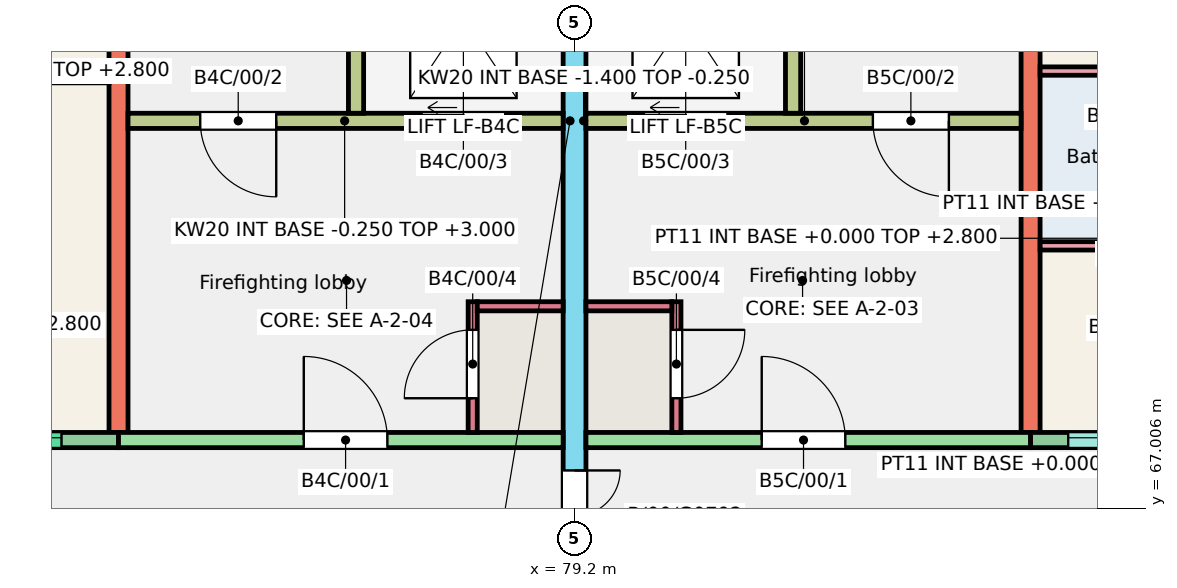
"""IFC4 building model, lengths in metres.
Left out: names, types, materials, properties, quantities, classifications, styles, units other than length and angle.
Written with IfcOpenShell. Run it as: python <this file> out.ifc"""

import sys

from ifc_helpers import new_model, si_unit, direction, frame, frame_2d, origin, place, context, subcontext, project, spatial, rectangle, extrude, element, fill, save


model = new_model("IFC4")
c1 = context("Model", 3, precision=1e-05, world=origin(), true_north=direction((0.0, 1.0)))
c2 = subcontext(c1, "Body", "Model", "MODEL_VIEW")
j1 = project(units=[si_unit("LENGTHUNIT", "METRE"), si_unit("PLANEANGLEUNIT", "RADIAN")], contexts=[c1])
p1 = place(None, origin())
s1 = spatial("IfcSite", under=j1, at=p1, CompositionType="ELEMENT")
p2 = place(p1, origin())
s2 = spatial("IfcBuilding", under=s1, at=p2, CompositionType="ELEMENT")
p3 = place(p2, origin())
s3 = spatial("IfcBuildingStorey", under=s2, at=p3, CompositionType="ELEMENT", Elevation=0.0)
p4 = place(p3, frame((73.2, 68.0, -0.25), z_axis=(0.0, 0.0, 1.0), x_axis=(0.0, 1.0, 0.0)))
e1 = element("IfcWall", 1, at=p4, inside=s3, PredefinedType="SHEAR", context=c2, shape_type="SweptSolid", body=[
    extrude(rectangle(XDim=9.0, YDim=0.25, at=frame_2d((4.5, 0.0))), origin(), (0.0, 0.0, 1.0), 3.25),
])
p5 = place(p3, frame((79.2, 66.0, -0.25), z_axis=(0.0, 0.0, 1.0), x_axis=(0.0, 1.0, 0.0)))
e2 = element("IfcWall", 2, at=p5, inside=s3, PredefinedType="SHEAR", context=c2, shape_type="SweptSolid", body=[
    extrude(rectangle(XDim=11.0, YDim=0.3, at=frame_2d((5.5, 0.0))), origin(), (0.0, 0.0, 1.0), 3.25),
])
p6 = place(p5, frame((0.3, 0.0, 0.25)))
e3 = element("IfcOpeningElement", 3, at=p6, cuts=e2, PredefinedType="OPENING", context=c2, shape_type="SweptSolid", body=[
    extrude(rectangle(XDim=1.2, YDim=2.1, at=frame_2d((0.6, 1.05))), frame((0.0, 0.16, 0.0), z_axis=(0.0, -1.0, 0.0), x_axis=(1.0, 0.0, 0.0)), (0.0, 0.0, 1.0), 0.32),
])
p7 = place(p3, frame((85.2, 68.0, -0.25), z_axis=(0.0, 0.0, 1.0), x_axis=(0.0, 1.0, 0.0)))
e4 = element("IfcWall", 4, at=p7, inside=s3, PredefinedType="SHEAR", context=c2, shape_type="SweptSolid", body=[
    extrude(rectangle(XDim=9.0, YDim=0.25, at=frame_2d((4.5, 0.0))), origin(), (0.0, 0.0, 1.0), 3.25),
])
p8 = place(p3, frame((69.6, 67.9, -0.25), z_axis=(0.0, 0.0, 1.0), x_axis=(1.0, 0.0, 0.0)))
e5 = element("IfcWall", 5, at=p8, inside=s3, PredefinedType="SOLIDWALL", context=c2, shape_type="SweptSolid", body=[
    extrude(rectangle(XDim=3.6, YDim=0.2, at=frame_2d((1.8, 0.0))), origin(), (0.0, 0.0, 1.0), 3.25),
])
p9 = place(p8, frame((0.75, 0.0, 1.45)))
e6 = element("IfcOpeningElement", 6, at=p9, cuts=e5, PredefinedType="OPENING", context=c2, shape_type="SweptSolid", body=[
    extrude(rectangle(XDim=2.1, YDim=1.2, at=frame_2d((1.05, 0.6))), frame((0.0, 0.11, 0.0), z_axis=(0.0, -1.0, 0.0), x_axis=(1.0, 0.0, 0.0)), (0.0, 0.0, 1.0), 0.22),
])
p10 = place(p3, frame((73.2, 67.9, -0.25), z_axis=(0.0, 0.0, 1.0), x_axis=(1.0, 0.0, 0.0)))
e7 = element("IfcWall", 7, at=p10, inside=s3, PredefinedType="SHEAR", context=c2, shape_type="SweptSolid", body=[
    extrude(rectangle(XDim=5.85, YDim=0.2, at=frame_2d((2.925, 0.0))), origin(), (0.0, 0.0, 1.0), 3.25),
])
p11 = place(p10, frame((2.438, 0.0, 0.25)))
e8 = element("IfcOpeningElement", 8, at=p11, cuts=e7, PredefinedType="OPENING", context=c2, shape_type="SweptSolid", body=[
    extrude(rectangle(XDim=1.1, YDim=2.1, at=frame_2d((0.55, 1.05))), frame((0.0, 0.11, 0.0), z_axis=(0.0, -1.0, 0.0), x_axis=(1.0, 0.0, 0.0)), (0.0, 0.0, 1.0), 0.22),
])
p12 = place(p3, frame((73.325, 72.1, -0.25), z_axis=(0.0, 0.0, 1.0), x_axis=(1.0, 0.0, 0.0)))
e9 = element("IfcWall", 9, at=p12, inside=s3, PredefinedType="SHEAR", context=c2, shape_type="SweptSolid", body=[
    extrude(rectangle(XDim=5.725, YDim=0.2, at=frame_2d((2.863, 0.0))), origin(), (0.0, 0.0, 1.0), 3.25),
])
p13 = place(p12, frame((0.95, 0.0, 0.25)))
e10 = element("IfcOpeningElement", 10, at=p13, cuts=e9, PredefinedType="OPENING", context=c2, shape_type="SweptSolid", body=[
    extrude(rectangle(XDim=1.0, YDim=2.1, at=frame_2d((0.5, 1.05))), frame((0.0, 0.11, 0.0), z_axis=(0.0, -1.0, 0.0), x_axis=(1.0, 0.0, 0.0)), (0.0, 0.0, 1.0), 0.22),
])
p14 = place(p12, frame((3.863, 0.0, 0.25)))
e11 = element("IfcOpeningElement", 11, at=p14, cuts=e9, PredefinedType="OPENING", context=c2, shape_type="SweptSolid", body=[
    extrude(rectangle(XDim=1.1, YDim=2.1, at=frame_2d((0.55, 1.05))), frame((0.0, 0.11, 0.0), z_axis=(0.0, -1.0, 0.0), x_axis=(1.0, 0.0, 0.0)), (0.0, 0.0, 1.0), 0.22),
])
p15 = place(p3, frame((76.325, 72.2, -0.25), z_axis=(0.0, 0.0, 1.0), x_axis=(0.0, 1.0, 0.0)))
e12 = element("IfcWall", 12, at=p15, inside=s3, PredefinedType="SHEAR", context=c2, shape_type="SweptSolid", body=[
    extrude(rectangle(XDim=4.8, YDim=0.2, at=frame_2d((2.4, 0.0))), origin(), (0.0, 0.0, 1.0), 3.25),
])
p16 = place(p3, frame((77.86, 68.0, -0.25), z_axis=(0.0, 0.0, 1.0), x_axis=(0.0, 1.0, 0.0)))
e13 = element("IfcWall", 13, at=p16, inside=s3, PredefinedType="SHEAR", context=c2, shape_type="SweptSolid", body=[
    extrude(rectangle(XDim=1.72, YDim=0.12, at=frame_2d((0.86, 0.0))), origin(), (0.0, 0.0, 1.0), 3.25),
])
p17 = place(p16, frame((0.45, 0.0, 0.25)))
e14 = element("IfcOpeningElement", 14, at=p17, cuts=e13, PredefinedType="OPENING", context=c2, shape_type="SweptSolid", body=[
    extrude(rectangle(XDim=0.9, YDim=2.1, at=frame_2d((0.45, 1.05))), frame((0.0, 0.07, 0.0), z_axis=(0.0, -1.0, 0.0), x_axis=(1.0, 0.0, 0.0)), (0.0, 0.0, 1.0), 0.14),
])
p18 = place(p3, frame((77.92, 69.66, -0.25), z_axis=(0.0, 0.0, 1.0), x_axis=(1.0, 0.0, 0.0)))
e15 = element("IfcWall", 15, at=p18, inside=s3, PredefinedType="SHEAR", context=c2, shape_type="SweptSolid", body=[
    extrude(rectangle(XDim=1.13, YDim=0.12, at=frame_2d((0.565, 0.0))), origin(), (0.0, 0.0, 1.0), 3.25),
])
p19 = place(p3, frame((79.35, 67.9, -0.25), z_axis=(0.0, 0.0, 1.0), x_axis=(1.0, 0.0, 0.0)))
e16 = element("IfcWall", 16, at=p19, inside=s3, PredefinedType="SHEAR", context=c2, shape_type="SweptSolid", body=[
    extrude(rectangle(XDim=5.85, YDim=0.2, at=frame_2d((2.925, 0.0))), origin(), (0.0, 0.0, 1.0), 3.25),
])
p20 = place(p19, frame((2.312, 0.0, 0.25)))
e17 = element("IfcOpeningElement", 17, at=p20, cuts=e16, PredefinedType="OPENING", context=c2, shape_type="SweptSolid", body=[
    extrude(rectangle(XDim=1.1, YDim=2.1, at=frame_2d((0.55, 1.05))), frame((0.0, 0.11, 0.0), z_axis=(0.0, -1.0, 0.0), x_axis=(1.0, 0.0, 0.0)), (0.0, 0.0, 1.0), 0.22),
])
p21 = place(p3, frame((79.35, 72.1, -0.25), z_axis=(0.0, 0.0, 1.0), x_axis=(1.0, 0.0, 0.0)))
e18 = element("IfcWall", 18, at=p21, inside=s3, PredefinedType="SHEAR", context=c2, shape_type="SweptSolid", body=[
    extrude(rectangle(XDim=5.725, YDim=0.2, at=frame_2d((2.862, 0.0))), origin(), (0.0, 0.0, 1.0), 3.25),
])
p22 = place(p21, frame((3.775, 0.0, 0.25)))
e19 = element("IfcOpeningElement", 19, at=p22, cuts=e18, PredefinedType="OPENING", context=c2, shape_type="SweptSolid", body=[
    extrude(rectangle(XDim=1.0, YDim=2.1, at=frame_2d((0.5, 1.05))), frame((0.0, 0.11, 0.0), z_axis=(0.0, -1.0, 0.0), x_axis=(1.0, 0.0, 0.0)), (0.0, 0.0, 1.0), 0.22),
])
p23 = place(p21, frame((0.762, 0.0, 0.25)))
e20 = element("IfcOpeningElement", 20, at=p23, cuts=e18, PredefinedType="OPENING", context=c2, shape_type="SweptSolid", body=[
    extrude(rectangle(XDim=1.1, YDim=2.1, at=frame_2d((0.55, 1.05))), frame((0.0, 0.11, 0.0), z_axis=(0.0, -1.0, 0.0), x_axis=(1.0, 0.0, 0.0)), (0.0, 0.0, 1.0), 0.22),
])
p24 = place(p3, frame((82.075, 72.2, -0.25), z_axis=(0.0, 0.0, 1.0), x_axis=(0.0, 1.0, 0.0)))
e21 = element("IfcWall", 21, at=p24, inside=s3, PredefinedType="SHEAR", context=c2, shape_type="SweptSolid", body=[
    extrude(rectangle(XDim=4.8, YDim=0.2, at=frame_2d((2.4, 0.0))), origin(), (0.0, 0.0, 1.0), 3.25),
])
p25 = place(p3, frame((80.54, 68.0, -0.25), z_axis=(0.0, 0.0, 1.0), x_axis=(0.0, 1.0, 0.0)))
e22 = element("IfcWall", 22, at=p25, inside=s3, PredefinedType="SHEAR", context=c2, shape_type="SweptSolid", body=[
    extrude(rectangle(XDim=1.72, YDim=0.12, at=frame_2d((0.86, 0.0))), origin(), (0.0, 0.0, 1.0), 3.25),
])
p26 = place(p25, frame((0.45, 0.0, 0.25)))
e23 = element("IfcOpeningElement", 23, at=p26, cuts=e22, PredefinedType="OPENING", context=c2, shape_type="SweptSolid", body=[
    extrude(rectangle(XDim=0.9, YDim=2.1, at=frame_2d((0.45, 1.05))), frame((0.0, 0.07, 0.0), z_axis=(0.0, -1.0, 0.0), x_axis=(1.0, 0.0, 0.0)), (0.0, 0.0, 1.0), 0.14),
])
p27 = place(p3, frame((79.35, 69.66, -0.25), z_axis=(0.0, 0.0, 1.0), x_axis=(1.0, 0.0, 0.0)))
e24 = element("IfcWall", 24, at=p27, inside=s3, PredefinedType="SHEAR", context=c2, shape_type="SweptSolid", body=[
    extrude(rectangle(XDim=1.13, YDim=0.12, at=frame_2d((0.565, 0.0))), origin(), (0.0, 0.0, 1.0), 3.25),
])
p28 = place(p3, frame((85.2, 67.9, -0.25), z_axis=(0.0, 0.0, 1.0), x_axis=(1.0, 0.0, 0.0)))
e25 = element("IfcWall", 25, at=p28, inside=s3, PredefinedType="SOLIDWALL", context=c2, shape_type="SweptSolid", body=[
    extrude(rectangle(XDim=3.6, YDim=0.2, at=frame_2d((1.8, 0.0))), origin(), (0.0, 0.0, 1.0), 3.25),
])
p29 = place(p28, frame((0.495, 0.0, 1.35)))
e26 = element("IfcOpeningElement", 26, at=p29, cuts=e25, PredefinedType="OPENING", context=c2, shape_type="SweptSolid", body=[
    extrude(rectangle(XDim=1.2, YDim=1.3, at=frame_2d((0.6, 0.65))), frame((0.0, 0.11, 0.0), z_axis=(0.0, -1.0, 0.0), x_axis=(1.0, 0.0, 0.0)), (0.0, 0.0, 1.0), 0.22),
])
p30 = place(p28, frame((2.325, 0.0, 0.25)))
e27 = element("IfcOpeningElement", 27, at=p30, cuts=e25, PredefinedType="OPENING", context=c2, shape_type="SweptSolid", body=[
    extrude(rectangle(XDim=1.0, YDim=2.1, at=frame_2d((0.5, 1.05))), frame((0.0, 0.11, 0.0), z_axis=(0.0, -1.0, 0.0), x_axis=(1.0, 0.0, 0.0)), (0.0, 0.0, 1.0), 0.22),
])
p31 = place(p3, frame((76.225, 72.1, -1.4), z_axis=(0.0, 0.0, 1.0), x_axis=(1.0, 0.0, 0.0)))
e28 = element("IfcWall", 28, at=p31, inside=s3, PredefinedType="SHEAR", context=c2, shape_type="SweptSolid", body=[
    extrude(rectangle(XDim=2.975, YDim=0.2, at=frame_2d((1.487, 0.0))), origin(), (0.0, 0.0, 1.0), 1.15),
])
p32 = place(p3, frame((76.325, 72.2, -1.4), z_axis=(0.0, 0.0, 1.0), x_axis=(0.0, 1.0, 0.0)))
e29 = element("IfcWall", 29, at=p32, inside=s3, PredefinedType="SHEAR", context=c2, shape_type="SweptSolid", body=[
    extrude(rectangle(XDim=3.0, YDim=0.2, at=frame_2d((1.5, 0.0))), origin(), (0.0, 0.0, 1.0), 1.15),
])
p33 = place(p3, frame((79.125, 72.2, -1.4), z_axis=(0.0, 0.0, 1.0), x_axis=(0.0, 1.0, 0.0)))
e30 = element("IfcWall", 30, at=p33, inside=s3, PredefinedType="SHEAR", context=c2, shape_type="SweptSolid", body=[
    extrude(rectangle(XDim=3.0, YDim=0.15, at=frame_2d((1.5, 0.0))), origin(), (0.0, 0.0, 1.0), 1.15),
])
p34 = place(p3, frame((79.2, 72.1, -1.4), z_axis=(0.0, 0.0, 1.0), x_axis=(1.0, 0.0, 0.0)))
e31 = element("IfcWall", 31, at=p34, inside=s3, PredefinedType="SHEAR", context=c2, shape_type="SweptSolid", body=[
    extrude(rectangle(XDim=2.975, YDim=0.2, at=frame_2d((1.488, 0.0))), origin(), (0.0, 0.0, 1.0), 1.15),
])
p35 = place(p3, frame((82.075, 72.2, -1.4), z_axis=(0.0, 0.0, 1.0), x_axis=(0.0, 1.0, 0.0)))
e32 = element("IfcWall", 32, at=p35, inside=s3, PredefinedType="SHEAR", context=c2, shape_type="SweptSolid", body=[
    extrude(rectangle(XDim=3.0, YDim=0.2, at=frame_2d((1.5, 0.0))), origin(), (0.0, 0.0, 1.0), 1.15),
])
p36 = place(p3, frame((79.275, 72.2, -1.4), z_axis=(0.0, 0.0, 1.0), x_axis=(0.0, 1.0, 0.0)))
e33 = element("IfcWall", 33, at=p36, inside=s3, PredefinedType="SHEAR", context=c2, shape_type="SweptSolid", body=[
    extrude(rectangle(XDim=3.0, YDim=0.15, at=frame_2d((1.5, 0.0))), origin(), (0.0, 0.0, 1.0), 1.15),
])
p37 = place(p3, frame((69.725, 72.655, 0.0), z_axis=(0.0, 0.0, 1.0), x_axis=(1.0, 0.0, 0.0)))
e34 = element("IfcWall", 34, at=p37, inside=s3, PredefinedType="PARTITIONING", context=c2, shape_type="SweptSolid", body=[
    extrude(rectangle(XDim=3.35, YDim=0.11, at=frame_2d((1.675, 0.0))), origin(), (0.0, 0.0, 1.0), 2.8),
])
p38 = place(p3, frame((85.325, 70.455, 0.0), z_axis=(0.0, 0.0, 1.0), x_axis=(1.0, 0.0, 0.0)))
e35 = element("IfcWall", 35, at=p38, inside=s3, PredefinedType="PARTITIONING", context=c2, shape_type="SweptSolid", body=[
    extrude(rectangle(XDim=1.94, YDim=0.11, at=frame_2d((0.97, 0.0))), origin(), (0.0, 0.0, 1.0), 2.8),
])
p39 = place(p3, frame((85.325, 72.755, 0.0), z_axis=(0.0, 0.0, 1.0), x_axis=(1.0, 0.0, 0.0)))
e36 = element("IfcWall", 36, at=p39, inside=s3, PredefinedType="PARTITIONING", context=c2, shape_type="SweptSolid", body=[
    extrude(rectangle(XDim=3.35, YDim=0.11, at=frame_2d((1.675, 0.0))), origin(), (0.0, 0.0, 1.0), 2.8),
])
p40 = place(p39, frame((2.25, 0.0, 0.0)))
e37 = element("IfcOpeningElement", 37, at=p40, cuts=e36, PredefinedType="OPENING", context=c2, shape_type="SweptSolid", body=[
    extrude(rectangle(XDim=0.9, YDim=2.1, at=frame_2d((0.45, 1.05))), frame((0.0, 0.065, 0.0), z_axis=(0.0, -1.0, 0.0), x_axis=(1.0, 0.0, 0.0)), (0.0, 0.0, 1.0), 0.13),
])
p41 = place(p9, origin())
e38 = element("IfcWindow", 38, at=p41, inside=s3, PartitioningType="SINGLE_PANEL", PredefinedType="WINDOW", context=c2, shape_type="SweptSolid", body=[
    extrude(rectangle(XDim=2.1, YDim=1.2, at=frame_2d((1.05, 0.6))), frame((0.0, 0.06, 0.0), z_axis=(0.0, -1.0, 0.0), x_axis=(1.0, 0.0, 0.0)), (0.0, 0.0, 1.0), 0.06),
])
fill(e6, e38)
p42 = place(p29, origin())
e39 = element("IfcWindow", 39, at=p42, inside=s3, PartitioningType="SINGLE_PANEL", PredefinedType="WINDOW", context=c2, shape_type="SweptSolid", body=[
    extrude(rectangle(XDim=1.2, YDim=1.3, at=frame_2d((0.6, 0.65))), frame((0.0, 0.06, 0.0), z_axis=(0.0, -1.0, 0.0), x_axis=(1.0, 0.0, 0.0)), (0.0, 0.0, 1.0), 0.06),
])
fill(e26, e39)
p43 = place(p11, origin())
e40 = element("IfcDoor", 40, at=p43, inside=s3, OperationType="SINGLE_SWING_LEFT", PredefinedType="DOOR", context=c2, shape_type="SweptSolid", body=[
    extrude(rectangle(XDim=1.1, YDim=2.1, at=frame_2d((0.55, 1.05))), frame((0.0, 0.025, 0.0), z_axis=(0.0, -1.0, 0.0), x_axis=(1.0, 0.0, 0.0)), (0.0, 0.0, 1.0), 0.05),
])
fill(e8, e40)
p44 = place(p13, origin())
e41 = element("IfcDoor", 41, at=p44, inside=s3, OperationType="SINGLE_SWING_RIGHT", PredefinedType="DOOR", context=c2, shape_type="SweptSolid", body=[
    extrude(rectangle(XDim=1.0, YDim=2.1, at=frame_2d((0.5, 1.05))), frame((0.0, 0.025, 0.0), z_axis=(0.0, -1.0, 0.0), x_axis=(1.0, 0.0, 0.0)), (0.0, 0.0, 1.0), 0.05),
])
fill(e10, e41)
p45 = place(p14, origin())
e42 = element("IfcDoor", 42, at=p45, inside=s3, OperationType="DOUBLE_DOOR_SLIDING", PredefinedType="DOOR", context=c2, shape_type="SweptSolid", body=[
    extrude(rectangle(XDim=1.1, YDim=2.1, at=frame_2d((0.55, 1.05))), frame((0.0, 0.025, 0.0), z_axis=(0.0, -1.0, 0.0), x_axis=(1.0, 0.0, 0.0)), (0.0, 0.0, 1.0), 0.05),
])
fill(e11, e42)
p46 = place(p17, origin())
e43 = element("IfcDoor", 43, at=p46, inside=s3, OperationType="SINGLE_SWING_LEFT", PredefinedType="DOOR", context=c2, shape_type="SweptSolid", body=[
    extrude(rectangle(XDim=0.9, YDim=2.1, at=frame_2d((0.45, 1.05))), frame((0.0, 0.025, 0.0), z_axis=(0.0, -1.0, 0.0), x_axis=(1.0, 0.0, 0.0)), (0.0, 0.0, 1.0), 0.05),
])
fill(e14, e43)
p47 = place(p20, origin())
e44 = element("IfcDoor", 44, at=p47, inside=s3, OperationType="SINGLE_SWING_LEFT", PredefinedType="DOOR", context=c2, shape_type="SweptSolid", body=[
    extrude(rectangle(XDim=1.1, YDim=2.1, at=frame_2d((0.55, 1.05))), frame((0.0, 0.025, 0.0), z_axis=(0.0, -1.0, 0.0), x_axis=(1.0, 0.0, 0.0)), (0.0, 0.0, 1.0), 0.05),
])
fill(e17, e44)
p48 = place(p22, origin())
e45 = element("IfcDoor", 45, at=p48, inside=s3, OperationType="SINGLE_SWING_RIGHT", PredefinedType="DOOR", context=c2, shape_type="SweptSolid", body=[
    extrude(rectangle(XDim=1.0, YDim=2.1, at=frame_2d((0.5, 1.05))), frame((0.0, 0.025, 0.0), z_axis=(0.0, -1.0, 0.0), x_axis=(1.0, 0.0, 0.0)), (0.0, 0.0, 1.0), 0.05),
])
fill(e19, e45)
p49 = place(p23, origin())
e46 = element("IfcDoor", 46, at=p49, inside=s3, OperationType="DOUBLE_DOOR_SLIDING", PredefinedType="DOOR", context=c2, shape_type="SweptSolid", body=[
    extrude(rectangle(XDim=1.1, YDim=2.1, at=frame_2d((0.55, 1.05))), frame((0.0, 0.025, 0.0), z_axis=(0.0, -1.0, 0.0), x_axis=(1.0, 0.0, 0.0)), (0.0, 0.0, 1.0), 0.05),
])
fill(e20, e46)
p50 = place(p26, origin())
e47 = element("IfcDoor", 47, at=p50, inside=s3, OperationType="SINGLE_SWING_RIGHT", PredefinedType="DOOR", context=c2, shape_type="SweptSolid", body=[
    extrude(rectangle(XDim=0.9, YDim=2.1, at=frame_2d((0.45, 1.05))), frame((0.0, 0.025, 0.0), z_axis=(0.0, -1.0, 0.0), x_axis=(1.0, 0.0, 0.0)), (0.0, 0.0, 1.0), 0.05),
])
fill(e23, e47)
p51 = place(p6, origin())
e48 = element("IfcDoor", 48, at=p51, inside=s3, OperationType="DOUBLE_DOOR_SINGLE_SWING", PredefinedType="DOOR", context=c2, shape_type="SweptSolid", body=[
    extrude(rectangle(XDim=1.2, YDim=2.1, at=frame_2d((0.6, 1.05))), frame((0.0, 0.025, 0.0), z_axis=(0.0, -1.0, 0.0), x_axis=(1.0, 0.0, 0.0)), (0.0, 0.0, 1.0), 0.05),
])
fill(e3, e48)
save(model, sys.argv[1])
